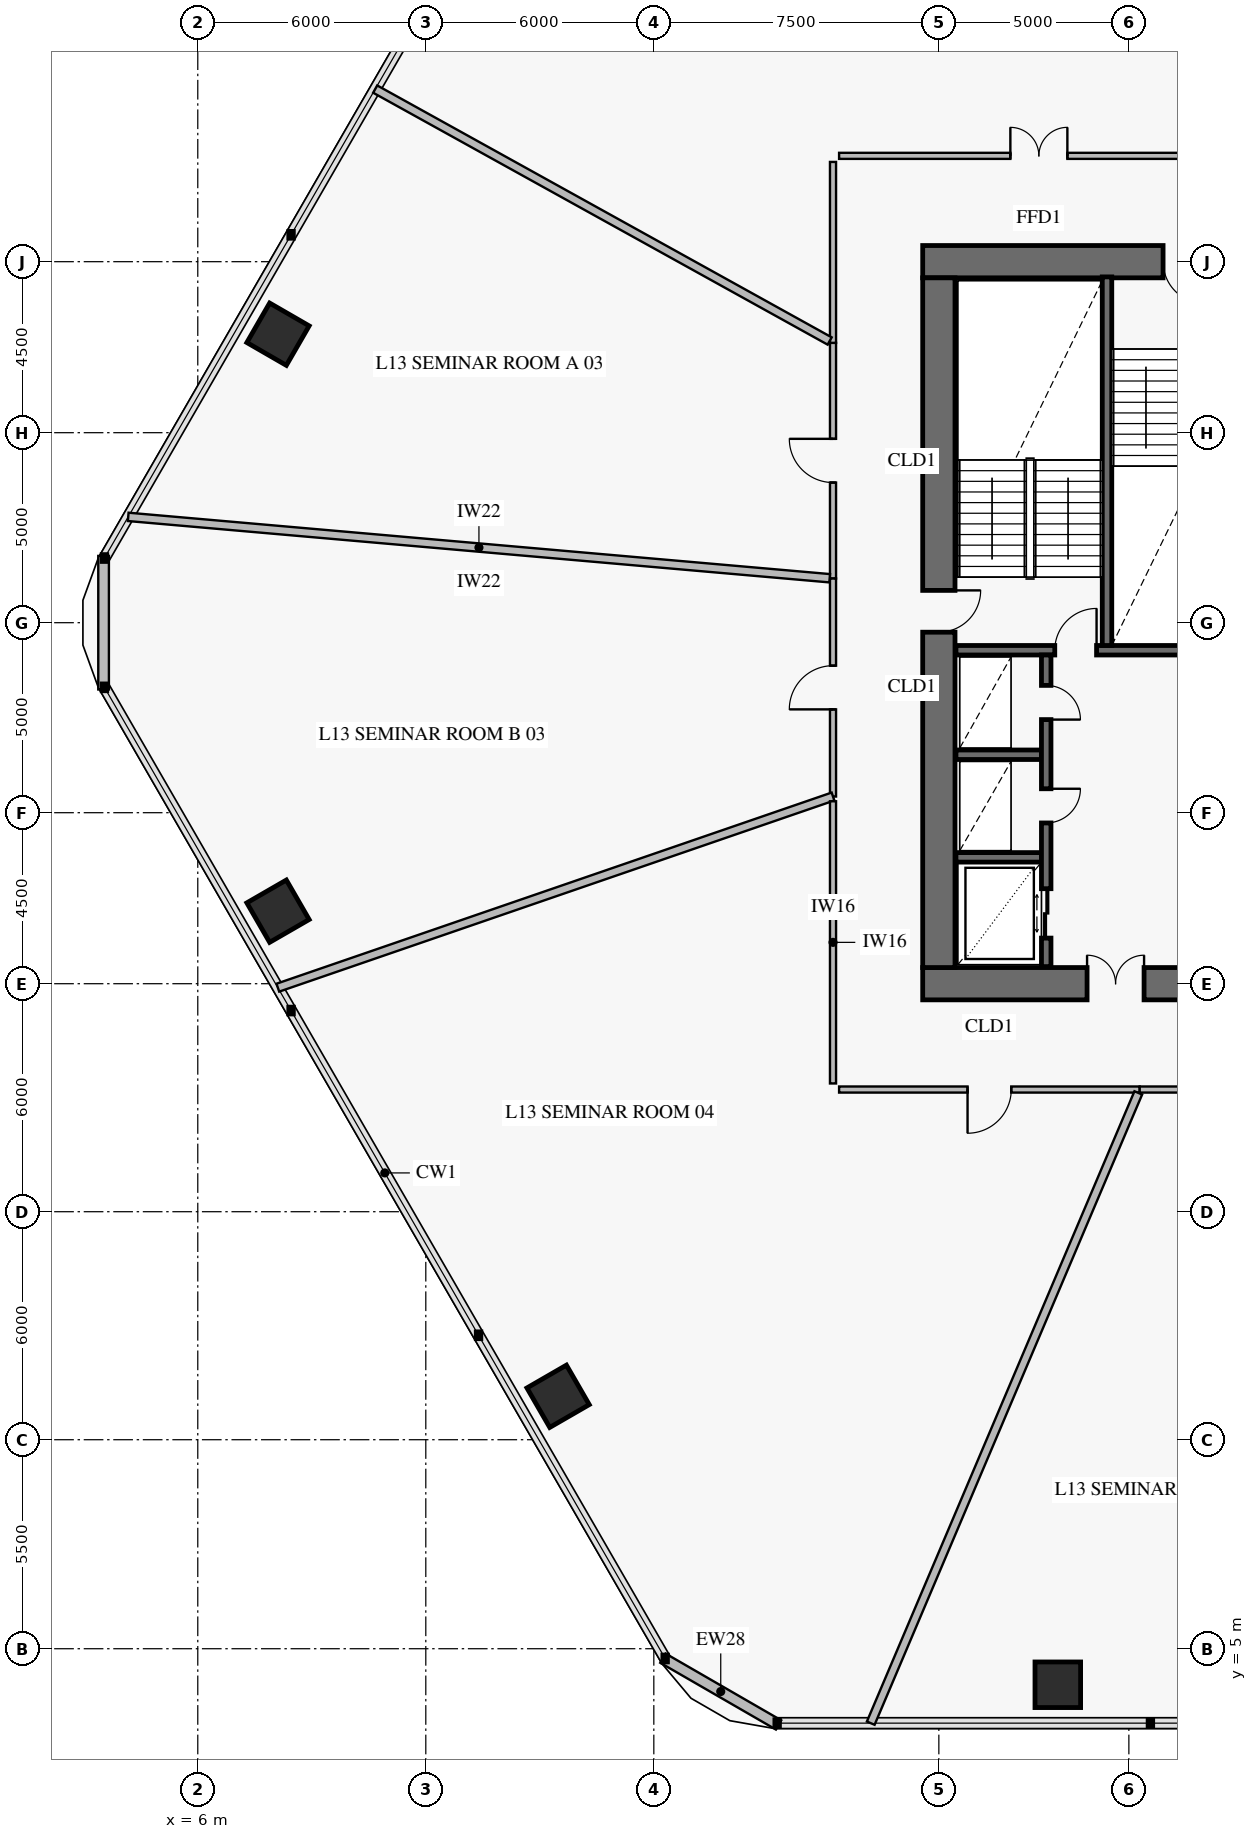
"""IFC4 building model, lengths in metres.
Left out: names, types, materials, properties, quantities, classifications, styles, units other than length and angle.
Written with IfcOpenShell. Run it as: python <this file> out.ifc"""

import sys

from ifc_helpers import new_model, si_unit, direction, frame, frame_2d, origin, origin_2d, place, context, subcontext, project, spatial, rectangle, extrude, element, fill, save


model = new_model("IFC4")
c1 = context("Model", 3, precision=1e-05, world=origin(), true_north=direction((0.0, 1.0)))
c2 = subcontext(c1, "Body", "Model", "MODEL_VIEW")
j1 = project(units=[si_unit("LENGTHUNIT", "METRE"), si_unit("PLANEANGLEUNIT", "RADIAN")], contexts=[c1])
p1 = place(None, origin())
s1 = spatial("IfcSite", under=j1, at=p1, CompositionType="ELEMENT")
p2 = place(p1, origin())
s2 = spatial("IfcBuilding", under=s1, at=p2, CompositionType="ELEMENT")
p3 = place(p2, frame((0.0, 0.0, 54.0)))
s3 = spatial("IfcBuildingStorey", under=s2, at=p3, CompositionType="ELEMENT", Elevation=54.0)
p4 = place(p3, frame((25.075, 22.5, 0.0), z_axis=(0.0, 0.0, 1.0), x_axis=(1.0, 0.0, 0.0)))
e1 = element("IfcWall", 1, at=p4, inside=s3, PredefinedType="SHEAR", context=c2, shape_type="SweptSolid", body=[
    extrude(rectangle(XDim=9.975, YDim=0.85, at=frame_2d((4.988, 0.0))), origin(), (0.0, 0.0, 1.0), 4.2),
])
p5 = place(p4, frame((4.325, 0.0, 0.0)))
e2 = element("IfcOpeningElement", 2, at=p5, cuts=e1, PredefinedType="OPENING", context=c2, shape_type="SweptSolid", body=[
    extrude(rectangle(XDim=1.5, YDim=2.15, at=frame_2d((0.75, 1.075))), frame((0.0, 0.437, 0.0), z_axis=(0.0, -1.0, 0.0), x_axis=(1.0, 0.0, 0.0)), (0.0, 0.0, 1.0), 0.874),
])
p6 = place(p3, frame((36.75, 41.5, 0.0), z_axis=(0.0, 0.0, 1.0), x_axis=(-1.0, 0.0, 0.0)))
e3 = element("IfcWall", 3, at=p6, inside=s3, PredefinedType="SHEAR", context=c2, shape_type="SweptSolid", body=[
    extrude(rectangle(XDim=11.675, YDim=0.85, at=frame_2d((5.837, 0.0))), origin(), (0.0, 0.0, 1.0), 4.2),
])
p7 = place(p6, frame((4.25, 0.0, 0.0)))
e4 = element("IfcOpeningElement", 4, at=p7, cuts=e3, PredefinedType="OPENING", context=c2, shape_type="SweptSolid", body=[
    extrude(rectangle(XDim=1.1, YDim=2.15, at=frame_2d((0.55, 1.075))), frame((0.0, 0.437, 0.0), z_axis=(0.0, -1.0, 0.0), x_axis=(1.0, 0.0, 0.0)), (0.0, 0.0, 1.0), 0.874),
])
p8 = place(p3, frame((25.5, 22.925, 0.0), z_axis=(0.0, 0.0, 1.0), x_axis=(0.0, 1.0, 0.0)))
e5 = element("IfcWall", 5, at=p8, inside=s3, PredefinedType="SHEAR", context=c2, shape_type="SweptSolid", body=[
    extrude(rectangle(XDim=18.15, YDim=0.85, at=frame_2d((9.075, 0.0))), origin(), (0.0, 0.0, 1.0), 4.2),
])
p9 = place(p8, frame((8.825, 0.0, 0.0)))
e6 = element("IfcOpeningElement", 6, at=p9, cuts=e5, PredefinedType="OPENING", context=c2, shape_type="SweptSolid", body=[
    extrude(rectangle(XDim=1.1, YDim=2.15, at=frame_2d((0.55, 1.075))), frame((0.0, 0.437, 0.0), z_axis=(0.0, -1.0, 0.0), x_axis=(1.0, 0.0, 0.0)), (0.0, 0.0, 1.0), 0.874),
])
for number, where, z_axis, x_axis in (
    (7, (8.111, 39.592, 0.0), (0.0, 0.0, 1.0), (-0.5, -0.866, 0.0)),
    (8, (8.111, 24.408, 0.0), (0.0, 0.0, 1.0), (0.5, -0.866, 0.0)),
    (9, (15.481, 11.643, 0.0), (0.0, 0.0, 1.0), (0.5, -0.866, 0.0)),
    (10, (28.63, 4.052, 0.0), (0.0, 0.0, 1.0), (1.0, 0.0, 0.0)),
):
    element("IfcColumn", number, at=place(p3, frame(where, z_axis=z_axis, x_axis=x_axis)), inside=s3, PredefinedType="COLUMN", context=c2, shape_type="SweptSolid", body=[
        extrude(rectangle(XDim=1.2, YDim=1.2, at=origin_2d()), origin(), (0.0, 0.0, 1.0), 3.92),
    ])
p10 = place(p3, frame((21.283, 2.994, 0.0), z_axis=(0.0, 0.0, 1.0), x_axis=(-0.866007452331, 0.500031091541, 0.0)))
e11 = element("IfcWall", 11, at=p10, inside=s3, PredefinedType="SOLIDWALL", context=c2, shape_type="SweptSolid", body=[
    extrude(rectangle(XDim=3.515, YDim=0.28, at=frame_2d((1.757, 0.0))), origin(), (0.0, 0.0, 1.0), 3.92),
])
p11 = place(p3, frame((3.521, 30.242, 0.0), z_axis=(0.0, 0.0, 1.0), x_axis=(0.0, 1.0, 0.0)))
e12 = element("IfcWall", 12, at=p11, inside=s3, PredefinedType="SOLIDWALL", context=c2, shape_type="SweptSolid", body=[
    extrude(rectangle(XDim=3.515, YDim=0.28, at=frame_2d((1.758, 0.0))), origin(), (0.0, 0.0, 1.0), 3.92),
])
p12 = place(p3, frame((25.95, 31.275, 0.0), z_axis=(0.0, 0.0, 1.0), x_axis=(1.0, 0.0, 0.0)))
e13 = element("IfcWall", 13, at=p12, inside=s3, PredefinedType="SOLIDWALL", context=c2, shape_type="SweptSolid", body=[
    extrude(rectangle(XDim=20.1, YDim=0.25, at=frame_2d((10.05, 0.0))), origin(), (0.0, 0.0, 1.0), 4.2),
])
p13 = place(p12, frame((2.6, 0.0, 0.0)))
e14 = element("IfcOpeningElement", 14, at=p13, cuts=e13, PredefinedType="OPENING", context=c2, shape_type="SweptSolid", body=[
    extrude(rectangle(XDim=1.1, YDim=2.15, at=frame_2d((0.55, 1.075))), frame((0.0, 0.137, 0.0), z_axis=(0.0, -1.0, 0.0), x_axis=(1.0, 0.0, 0.0)), (0.0, 0.0, 1.0), 0.274),
])
p14 = place(p12, frame((10.6, 0.0, 0.0)))
e15 = element("IfcOpeningElement", 15, at=p14, cuts=e13, PredefinedType="OPENING", context=c2, shape_type="SweptSolid", body=[
    extrude(rectangle(XDim=1.1, YDim=2.15, at=frame_2d((0.55, 1.075))), frame((0.0, 0.137, 0.0), z_axis=(0.0, -1.0, 0.0), x_axis=(1.0, 0.0, 0.0)), (0.0, 0.0, 1.0), 0.274),
])
p15 = place(p12, frame((16.35, 0.0, 0.0)))
e16 = element("IfcOpeningElement", 16, at=p15, cuts=e13, PredefinedType="OPENING", context=c2, shape_type="SweptSolid", body=[
    extrude(rectangle(XDim=1.1, YDim=2.15, at=frame_2d((0.55, 1.075))), frame((0.0, 0.137, 0.0), z_axis=(0.0, -1.0, 0.0), x_axis=(1.0, 0.0, 0.0)), (0.0, 0.0, 1.0), 0.274),
])
p16 = place(p3, frame((29.925, 31.4, 0.0), z_axis=(0.0, 0.0, 1.0), x_axis=(0.0, 1.0, 0.0)))
e17 = element("IfcWall", 17, at=p16, inside=s3, PredefinedType="SOLIDWALL", context=c2, shape_type="SweptSolid", body=[
    extrude(rectangle(XDim=9.7, YDim=0.25, at=frame_2d((4.85, 0.0))), origin(), (0.0, 0.0, 1.0), 4.2),
])
for number, where, z_axis, x_axis in (
    (18, (25.95, 25.825, 0.0), (0.0, 0.0, 1.0), (1.0, 0.0, 0.0)),
    (19, (25.95, 28.525, 0.0), (0.0, 0.0, 1.0), (1.0, 0.0, 0.0)),
):
    element("IfcWall", number, at=place(p3, frame(where, z_axis=z_axis, x_axis=x_axis)), inside=s3, PredefinedType="SOLIDWALL", context=c2, shape_type="SweptSolid", body=[
        extrude(rectangle(XDim=2.25, YDim=0.25, at=frame_2d((1.125, 0.0))), origin(), (0.0, 0.0, 1.0), 4.2),
    ])
p17 = place(p3, frame((28.325, 22.95, 0.0), z_axis=(0.0, 0.0, 1.0), x_axis=(0.0, 1.0, 0.0)))
e20 = element("IfcWall", 20, at=p17, inside=s3, PredefinedType="SOLIDWALL", context=c2, shape_type="SweptSolid", body=[
    extrude(rectangle(XDim=8.2, YDim=0.25, at=frame_2d((4.1, 0.0))), origin(), (0.0, 0.0, 1.0), 4.2),
])
p18 = place(p17, frame((0.75, 0.0, 0.0)))
e21 = element("IfcOpeningElement", 21, at=p18, cuts=e20, PredefinedType="OPENING", context=c2, shape_type="SweptSolid", body=[
    extrude(rectangle(XDim=1.3, YDim=2.3, at=frame_2d((0.65, 1.15))), frame((0.0, 0.137, 0.0), z_axis=(0.0, -1.0, 0.0), x_axis=(1.0, 0.0, 0.0)), (0.0, 0.0, 1.0), 0.274),
])
p19 = place(p17, frame((3.78, 0.0, 0.0)))
e22 = element("IfcOpeningElement", 22, at=p19, cuts=e20, PredefinedType="OPENING", context=c2, shape_type="SweptSolid", body=[
    extrude(rectangle(XDim=0.9, YDim=2.1, at=frame_2d((0.45, 1.05))), frame((0.0, 0.137, 0.0), z_axis=(0.0, -1.0, 0.0), x_axis=(1.0, 0.0, 0.0)), (0.0, 0.0, 1.0), 0.274),
])
p20 = place(p17, frame((6.5, 0.0, 0.0)))
e23 = element("IfcOpeningElement", 23, at=p20, cuts=e20, PredefinedType="OPENING", context=c2, shape_type="SweptSolid", body=[
    extrude(rectangle(XDim=0.9, YDim=2.1, at=frame_2d((0.45, 1.05))), frame((0.0, 0.137, 0.0), z_axis=(0.0, -1.0, 0.0), x_axis=(1.0, 0.0, 0.0)), (0.0, 0.0, 1.0), 0.274),
])
p21 = place(p3, frame((33.389, 44.285, 0.0), z_axis=(0.0, 0.0, 1.0), x_axis=(-1.0, 0.0, 0.0)))
e24 = element("IfcWall", 24, at=p21, inside=s3, PredefinedType="PARTITIONING", context=c2, shape_type="SweptSolid", body=[
    extrude(rectangle(XDim=10.514, YDim=0.16, at=frame_2d((5.257, 0.0))), origin(), (0.0, 0.0, 1.0), 3.22),
])
p22 = place(p21, frame((4.507, 0.0, 0.0)))
e25 = element("IfcOpeningElement", 25, at=p22, cuts=e24, PredefinedType="OPENING", context=c2, shape_type="SweptSolid", body=[
    extrude(rectangle(XDim=1.5, YDim=2.15, at=frame_2d((0.75, 1.075))), frame((0.0, 0.092, 0.0), z_axis=(0.0, -1.0, 0.0), x_axis=(1.0, 0.0, 0.0)), (0.0, 0.0, 1.0), 0.184),
])
p23 = place(p3, frame((22.715, 39.364, 0.0), z_axis=(0.0, 0.0, 1.0), x_axis=(0.0, -1.0, 0.0)))
e26 = element("IfcWall", 26, at=p23, inside=s3, PredefinedType="PARTITIONING", context=c2, shape_type="SweptSolid", body=[
    extrude(rectangle(XDim=6.202, YDim=0.16, at=frame_2d((3.101, 0.0))), origin(), (0.0, 0.0, 1.0), 3.22),
])
p24 = place(p23, frame((2.526, 0.0, 0.0)))
e27 = element("IfcOpeningElement", 27, at=p24, cuts=e26, PredefinedType="OPENING", context=c2, shape_type="SweptSolid", body=[
    extrude(rectangle(XDim=1.15, YDim=2.2, at=frame_2d((0.575, 1.1))), frame((0.0, 0.092, 0.0), z_axis=(0.0, -1.0, 0.0), x_axis=(1.0, 0.0, 0.0)), (0.0, 0.0, 1.0), 0.184),
])
p25 = place(p3, frame((22.715, 33.162, 0.0), z_axis=(0.0, 0.0, 1.0), x_axis=(0.0, -1.0, 0.0)))
e28 = element("IfcWall", 28, at=p25, inside=s3, PredefinedType="PARTITIONING", context=c2, shape_type="SweptSolid", body=[
    extrude(rectangle(XDim=5.737, YDim=0.16, at=frame_2d((2.868, 0.0))), origin(), (0.0, 0.0, 1.0), 3.22),
])
p26 = place(p25, frame((2.293, 0.0, 0.0)))
e29 = element("IfcOpeningElement", 29, at=p26, cuts=e28, PredefinedType="OPENING", context=c2, shape_type="SweptSolid", body=[
    extrude(rectangle(XDim=1.15, YDim=2.2, at=frame_2d((0.575, 1.1))), frame((0.0, 0.092, 0.0), z_axis=(0.0, -1.0, 0.0), x_axis=(1.0, 0.0, 0.0)), (0.0, 0.0, 1.0), 0.184),
])
p27 = place(p3, frame((22.875, 19.715, 0.0), z_axis=(0.0, 0.0, 1.0), x_axis=(1.0, 0.0, 0.0)))
e30 = element("IfcWall", 30, at=p27, inside=s3, PredefinedType="PARTITIONING", context=c2, shape_type="SweptSolid", body=[
    extrude(rectangle(XDim=7.91, YDim=0.16, at=frame_2d((3.955, 0.0))), origin(), (0.0, 0.0, 1.0), 3.22),
])
p28 = place(p27, frame((3.38, 0.0, 0.0)))
e31 = element("IfcOpeningElement", 31, at=p28, cuts=e30, PredefinedType="OPENING", context=c2, shape_type="SweptSolid", body=[
    extrude(rectangle(XDim=1.15, YDim=2.2, at=frame_2d((0.575, 1.1))), frame((0.0, 0.092, 0.0), z_axis=(0.0, -1.0, 0.0), x_axis=(1.0, 0.0, 0.0)), (0.0, 0.0, 1.0), 0.184),
])
p29 = place(p3, frame((30.785, 19.715, 0.0), z_axis=(0.0, 0.0, 1.0), x_axis=(1.0, 0.0, 0.0)))
e32 = element("IfcWall", 32, at=p29, inside=s3, PredefinedType="PARTITIONING", context=c2, shape_type="SweptSolid", body=[
    extrude(rectangle(XDim=5.429, YDim=0.16, at=frame_2d((2.714, 0.0))), origin(), (0.0, 0.0, 1.0), 3.22),
])
p30 = place(p29, frame((2.139, 0.0, 0.0)))
e33 = element("IfcOpeningElement", 33, at=p30, cuts=e32, PredefinedType="OPENING", context=c2, shape_type="SweptSolid", body=[
    extrude(rectangle(XDim=1.15, YDim=2.2, at=frame_2d((0.575, 1.1))), frame((0.0, 0.092, 0.0), z_axis=(0.0, -1.0, 0.0), x_axis=(1.0, 0.0, 0.0)), (0.0, 0.0, 1.0), 0.184),
])
p31 = place(p3, frame((33.37, 44.373, 0.0), z_axis=(0.0, 0.0, 1.0), x_axis=(-0.207914205497, 0.978147066219, 0.0)))
e34 = element("IfcWall", 34, at=p31, inside=s3, PredefinedType="PARTITIONING", context=c2, shape_type="SweptSolid", body=[
    extrude(rectangle(XDim=16.956, YDim=0.22, at=frame_2d((8.478, 0.0))), origin(), (0.0, 0.0, 1.0), 3.17),
])
p32 = place(p3, frame((22.715, 44.125, 0.0), z_axis=(0.0, 0.0, 1.0), x_axis=(0.0, -1.0, 0.0)))
e35 = element("IfcWall", 35, at=p32, inside=s3, PredefinedType="PARTITIONING", context=c2, shape_type="SweptSolid", body=[
    extrude(rectangle(XDim=4.761, YDim=0.16, at=frame_2d((2.38, 0.0))), origin(), (0.0, 0.0, 1.0), 3.92),
])
p33 = place(p3, frame((22.627, 39.413, 0.0), z_axis=(0.0, 0.0, 1.0), x_axis=(-0.874620963666, 0.484807353405, 0.0)))
e36 = element("IfcWall", 36, at=p33, inside=s3, PredefinedType="PARTITIONING", context=c2, shape_type="SweptSolid", body=[
    extrude(rectangle(XDim=13.673, YDim=0.22, at=frame_2d((6.836, 0.0))), origin(), (0.0, 0.0, 1.0), 3.17),
])
p34 = place(p3, frame((22.627, 33.17, 0.0), z_axis=(0.0, 0.0, 1.0), x_axis=(-0.99619391773, 0.087164661858, 0.0)))
e37 = element("IfcWall", 37, at=p34, inside=s3, PredefinedType="PARTITIONING", context=c2, shape_type="SweptSolid", body=[
    extrude(rectangle(XDim=18.528, YDim=0.22, at=frame_2d((9.264, 0.0))), origin(), (0.0, 0.0, 1.0), 3.17),
])
p35 = place(p3, frame((22.715, 27.426, 0.0), z_axis=(0.0, 0.0, 1.0), x_axis=(-0.945519485553, -0.325565511746, 0.0)))
e38 = element("IfcWall", 38, at=p35, inside=s3, PredefinedType="PARTITIONING", context=c2, shape_type="SweptSolid", body=[
    extrude(rectangle(XDim=15.45, YDim=0.22, at=frame_2d((7.725, 0.0))), origin(), (0.0, 0.0, 1.0), 3.17),
])
p36 = place(p3, frame((22.715, 27.301, 0.0), z_axis=(0.0, 0.0, 1.0), x_axis=(0.0, -1.0, 0.0)))
e39 = element("IfcWall", 39, at=p36, inside=s3, PredefinedType="PARTITIONING", context=c2, shape_type="SweptSolid", body=[
    extrude(rectangle(XDim=7.426, YDim=0.16, at=frame_2d((3.713, 0.0))), origin(), (0.0, 0.0, 1.0), 3.92),
])
p37 = place(p3, frame((30.748, 19.627, 0.0), z_axis=(0.0, 0.0, 1.0), x_axis=(-0.39073948494, -0.920501306305, 0.0)))
e40 = element("IfcWall", 40, at=p37, inside=s3, PredefinedType="PARTITIONING", context=c2, shape_type="SweptSolid", body=[
    extrude(rectangle(XDim=18.018, YDim=0.22, at=frame_2d((9.009, 0.0))), origin(), (0.0, 0.0, 1.0), 3.17),
])
p38 = place(p9, frame((1.1, 0.0, 0.0), z_axis=(0.0, 0.0, 1.0), x_axis=(-1.0, 0.0, 0.0)))
e41 = element("IfcDoor", 41, at=p38, inside=s3, OperationType="SINGLE_SWING_LEFT", PredefinedType="USERDEFINED", context=c2, shape_type="SweptSolid", body=[
    extrude(rectangle(XDim=1.1, YDim=2.15, at=frame_2d((0.55, 1.075))), frame((0.0, 0.025, 0.0), z_axis=(0.0, -1.0, 0.0), x_axis=(1.0, 0.0, 0.0)), (0.0, 0.0, 1.0), 0.05),
])
fill(e6, e41)
p39 = place(p7, origin())
e42 = element("IfcDoor", 42, at=p39, inside=s3, OperationType="SINGLE_SWING_LEFT", PredefinedType="USERDEFINED", context=c2, shape_type="SweptSolid", body=[
    extrude(rectangle(XDim=1.1, YDim=2.15, at=frame_2d((0.55, 1.075))), frame((0.0, 0.025, 0.0), z_axis=(0.0, -1.0, 0.0), x_axis=(1.0, 0.0, 0.0)), (0.0, 0.0, 1.0), 0.05),
])
fill(e4, e42)
p40 = place(p5, origin())
e43 = element("IfcDoor", 43, at=p40, inside=s3, OperationType="DOUBLE_DOOR_SINGLE_SWING", PredefinedType="DOOR", context=c2, shape_type="SweptSolid", body=[
    extrude(rectangle(XDim=1.5, YDim=2.15, at=frame_2d((0.75, 1.075))), frame((0.0, 0.025, 0.0), z_axis=(0.0, -1.0, 0.0), x_axis=(1.0, 0.0, 0.0)), (0.0, 0.0, 1.0), 0.05),
])
fill(e2, e43)
p41 = place(p13, origin())
e44 = element("IfcDoor", 44, at=p41, inside=s3, OperationType="SINGLE_SWING_RIGHT", PredefinedType="USERDEFINED", context=c2, shape_type="SweptSolid", body=[
    extrude(rectangle(XDim=1.1, YDim=2.15, at=frame_2d((0.55, 1.075))), frame((0.0, 0.025, 0.0), z_axis=(0.0, -1.0, 0.0), x_axis=(1.0, 0.0, 0.0)), (0.0, 0.0, 1.0), 0.05),
])
fill(e14, e44)
p42 = place(p18, frame((1.3, 0.0, 0.0), z_axis=(0.0, 0.0, 1.0), x_axis=(-1.0, 0.0, 0.0)))
e45 = element("IfcDoor", 45, at=p42, inside=s3, OperationType="DOUBLE_DOOR_SLIDING", PredefinedType="DOOR", context=c2, shape_type="SweptSolid", body=[
    extrude(rectangle(XDim=1.3, YDim=2.3, at=frame_2d((0.65, 1.15))), frame((0.0, 0.025, 0.0), z_axis=(0.0, -1.0, 0.0), x_axis=(1.0, 0.0, 0.0)), (0.0, 0.0, 1.0), 0.05),
])
fill(e21, e45)
p43 = place(p19, frame((0.9, 0.0, 0.0), z_axis=(0.0, 0.0, 1.0), x_axis=(-1.0, 0.0, 0.0)))
e46 = element("IfcDoor", 46, at=p43, inside=s3, OperationType="SINGLE_SWING_LEFT", PredefinedType="DOOR", context=c2, shape_type="SweptSolid", body=[
    extrude(rectangle(XDim=0.9, YDim=2.1, at=frame_2d((0.45, 1.05))), frame((0.0, 0.025, 0.0), z_axis=(0.0, -1.0, 0.0), x_axis=(1.0, 0.0, 0.0)), (0.0, 0.0, 1.0), 0.05),
])
fill(e22, e46)
p44 = place(p20, frame((0.9, 0.0, 0.0), z_axis=(0.0, 0.0, 1.0), x_axis=(-1.0, 0.0, 0.0)))
e47 = element("IfcDoor", 47, at=p44, inside=s3, OperationType="SINGLE_SWING_RIGHT", PredefinedType="DOOR", context=c2, shape_type="SweptSolid", body=[
    extrude(rectangle(XDim=0.9, YDim=2.1, at=frame_2d((0.45, 1.05))), frame((0.0, 0.025, 0.0), z_axis=(0.0, -1.0, 0.0), x_axis=(1.0, 0.0, 0.0)), (0.0, 0.0, 1.0), 0.05),
])
fill(e23, e47)
p45 = place(p22, frame((1.5, 0.0, 0.0), z_axis=(0.0, 0.0, 1.0), x_axis=(-1.0, 0.0, 0.0)))
e48 = element("IfcDoor", 48, at=p45, inside=s3, OperationType="DOUBLE_DOOR_SINGLE_SWING", PredefinedType="DOOR", context=c2, shape_type="SweptSolid", body=[
    extrude(rectangle(XDim=1.5, YDim=2.15, at=frame_2d((0.75, 1.075))), frame((0.0, 0.025, 0.0), z_axis=(0.0, -1.0, 0.0), x_axis=(1.0, 0.0, 0.0)), (0.0, 0.0, 1.0), 0.05),
])
fill(e25, e48)
p46 = place(p24, frame((1.15, 0.0, 0.0), z_axis=(0.0, 0.0, 1.0), x_axis=(-1.0, 0.0, 0.0)))
e49 = element("IfcDoor", 49, at=p46, inside=s3, OperationType="SINGLE_SWING_RIGHT", PredefinedType="DOOR", context=c2, shape_type="SweptSolid", body=[
    extrude(rectangle(XDim=1.15, YDim=2.2, at=frame_2d((0.575, 1.1))), frame((0.0, 0.025, 0.0), z_axis=(0.0, -1.0, 0.0), x_axis=(1.0, 0.0, 0.0)), (0.0, 0.0, 1.0), 0.05),
])
fill(e27, e49)
p47 = place(p26, frame((1.15, 0.0, 0.0), z_axis=(0.0, 0.0, 1.0), x_axis=(-1.0, 0.0, 0.0)))
e50 = element("IfcDoor", 50, at=p47, inside=s3, OperationType="SINGLE_SWING_LEFT", PredefinedType="DOOR", context=c2, shape_type="SweptSolid", body=[
    extrude(rectangle(XDim=1.15, YDim=2.2, at=frame_2d((0.575, 1.1))), frame((0.0, 0.025, 0.0), z_axis=(0.0, -1.0, 0.0), x_axis=(1.0, 0.0, 0.0)), (0.0, 0.0, 1.0), 0.05),
])
fill(e29, e50)
p48 = place(p28, frame((1.15, 0.0, 0.0), z_axis=(0.0, 0.0, 1.0), x_axis=(-1.0, 0.0, 0.0)))
e51 = element("IfcDoor", 51, at=p48, inside=s3, OperationType="SINGLE_SWING_RIGHT", PredefinedType="DOOR", context=c2, shape_type="SweptSolid", body=[
    extrude(rectangle(XDim=1.15, YDim=2.2, at=frame_2d((0.575, 1.1))), frame((0.0, 0.025, 0.0), z_axis=(0.0, -1.0, 0.0), x_axis=(1.0, 0.0, 0.0)), (0.0, 0.0, 1.0), 0.05),
])
fill(e31, e51)
save(model, sys.argv[1])
